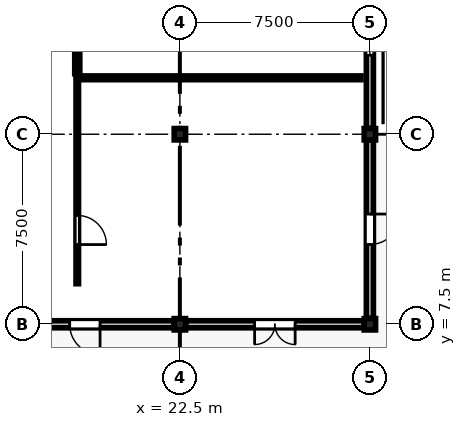
"""IFC4 building model, lengths in metres.
Left out: names, types, materials, properties, quantities, classifications, styles, units other than length and angle.
Written with IfcOpenShell. Run it as: python <this file> out.ifc"""

import sys

from ifc_helpers import new_model, si_unit, direction, frame, frame_2d, origin, origin_2d, place, context, subcontext, project, spatial, rectangle, extrude, element, fill, save


model = new_model("IFC4")
c1 = context("Model", 3, precision=1e-05, world=origin(), true_north=direction((0.0, 1.0)))
c2 = subcontext(c1, "Body", "Model", "MODEL_VIEW")
j1 = project(units=[si_unit("LENGTHUNIT", "METRE"), si_unit("PLANEANGLEUNIT", "RADIAN")], contexts=[c1])
p1 = place(None, origin())
s1 = spatial("IfcSite", under=j1, at=p1, CompositionType="ELEMENT")
p2 = place(p1, origin())
s2 = spatial("IfcBuilding", under=s1, at=p2, CompositionType="ELEMENT")
p3 = place(p2, frame((0.0, 0.0, 30.0)))
s3 = spatial("IfcBuildingStorey", under=s2, at=p3, CompositionType="ELEMENT", Elevation=30.0)
for number, where, z_axis, x_axis in (
    (1, (22.5, 7.5, 0.0), (0.0, 0.0, 1.0), (1.0, 0.0, 0.0)),
    (2, (22.5, 15.0, 0.0), (0.0, 0.0, 1.0), (1.0, 0.0, 0.0)),
    (3, (30.0, 7.5, 0.0), (0.0, 0.0, 1.0), (1.0, 0.0, 0.0)),
    (4, (30.0, 15.0, 0.0), (0.0, 0.0, 1.0), (1.0, 0.0, 0.0)),
):
    element("IfcColumn", number, at=place(p3, frame(where, z_axis=z_axis, x_axis=x_axis)), inside=s3, PredefinedType="COLUMN", context=c2, shape_type="SweptSolid", body=[
        extrude(rectangle(XDim=0.45, YDim=0.45, at=origin_2d()), origin(), (0.0, 0.0, 1.0), 4.05),
    ])
p4 = place(p3, frame((22.265, 7.5, 0.0), z_axis=(0.0, 0.0, 1.0), x_axis=(-1.0, 0.0, 0.0)))
e5 = element("IfcWall", 5, at=p4, inside=s3, PredefinedType="STANDARD", context=c2, shape_type="SweptSolid", body=[
    extrude(rectangle(XDim=7.03, YDim=0.28, at=frame_2d((3.515, 0.0))), origin(), (0.0, 0.0, 1.0), 3.23),
])
p5 = place(p4, frame((2.915, 0.0, 0.0)))
e6 = element("IfcOpeningElement", 6, at=p5, cuts=e5, PredefinedType="OPENING", context=c2, shape_type="SweptSolid", body=[
    extrude(rectangle(XDim=1.2, YDim=2.3, at=frame_2d((0.6, 1.15))), frame((0.0, 0.15, 0.0), z_axis=(0.0, -1.0, 0.0), x_axis=(1.0, 0.0, 0.0)), (0.0, 0.0, 1.0), 0.3),
])
p6 = place(p3, frame((29.765, 7.5, 0.0), z_axis=(0.0, 0.0, 1.0), x_axis=(-1.0, 0.0, 0.0)))
e7 = element("IfcWall", 7, at=p6, inside=s3, PredefinedType="STANDARD", context=c2, shape_type="SweptSolid", body=[
    extrude(rectangle(XDim=7.03, YDim=0.28, at=frame_2d((3.515, 0.0))), origin(), (0.0, 0.0, 1.0), 3.23),
])
p7 = place(p6, frame((2.715, 0.0, 0.0)))
e8 = element("IfcOpeningElement", 8, at=p7, cuts=e7, PredefinedType="OPENING", context=c2, shape_type="SweptSolid", body=[
    extrude(rectangle(XDim=1.6, YDim=2.35, at=frame_2d((0.8, 1.175))), frame((0.0, 0.15, 0.0), z_axis=(0.0, -1.0, 0.0), x_axis=(1.0, 0.0, 0.0)), (0.0, 0.0, 1.0), 0.3),
])
p8 = place(p3, frame((30.0, 14.765, 0.0), z_axis=(0.0, 0.0, 1.0), x_axis=(0.0, -1.0, 0.0)))
e9 = element("IfcWall", 9, at=p8, inside=s3, PredefinedType="STANDARD", context=c2, shape_type="SweptSolid", body=[
    extrude(rectangle(XDim=7.03, YDim=0.28, at=frame_2d((3.515, 0.0))), origin(), (0.0, 0.0, 1.0), 3.23),
])
p9 = place(p8, frame((2.915, 0.0, 0.0)))
e10 = element("IfcOpeningElement", 10, at=p9, cuts=e9, PredefinedType="OPENING", context=c2, shape_type="SweptSolid", body=[
    extrude(rectangle(XDim=1.2, YDim=2.3, at=frame_2d((0.6, 1.15))), frame((0.0, 0.15, 0.0), z_axis=(0.0, -1.0, 0.0), x_axis=(1.0, 0.0, 0.0)), (0.0, 0.0, 1.0), 0.3),
])
p10 = place(p3, frame((30.0, 22.35, 0.0), z_axis=(0.0, 0.0, 1.0), x_axis=(0.0, -1.0, 0.0)))
e11 = element("IfcWall", 11, at=p10, inside=s3, PredefinedType="STANDARD", context=c2, shape_type="SweptSolid", body=[
    extrude(rectangle(XDim=7.115, YDim=0.28, at=frame_2d((3.558, 0.0))), origin(), (0.0, 0.0, 1.0), 3.83),
])
p11 = place(p10, frame((2.883, 0.0, 0.85)))
e12 = element("IfcOpeningElement", 12, at=p11, cuts=e11, PredefinedType="OPENING", context=c2, shape_type="SweptSolid", body=[
    extrude(rectangle(XDim=1.35, YDim=2.25, at=frame_2d((0.675, 1.125))), frame((0.0, 0.15, 0.0), z_axis=(0.0, -1.0, 0.0), x_axis=(1.0, 0.0, 0.0)), (0.0, 0.0, 1.0), 0.3),
])
p12 = place(p3, frame((18.45, 17.227, 0.0), z_axis=(0.0, 0.0, 1.0), x_axis=(0.0, -1.0, 0.0)))
e13 = element("IfcWall", 13, at=p12, inside=s3, PredefinedType="PARTITIONING", context=c2, shape_type="SweptSolid", body=[
    extrude(rectangle(XDim=8.127, YDim=0.1, at=frame_2d((4.063, 0.0))), origin(), (0.0, 0.0, 1.0), 3.815),
])
p13 = place(p12, frame((5.432, 0.0, 0.0)))
e14 = element("IfcOpeningElement", 14, at=p13, cuts=e13, PredefinedType="OPENING", context=c2, shape_type="SweptSolid", body=[
    extrude(rectangle(XDim=1.15, YDim=2.2, at=frame_2d((0.575, 1.1))), frame((0.0, 0.06, 0.0), z_axis=(0.0, -1.0, 0.0), x_axis=(1.0, 0.0, 0.0)), (0.0, 0.0, 1.0), 0.12),
])
p14 = place(p3, frame((18.45, 27.034, 0.0), z_axis=(0.0, 0.0, 1.0), x_axis=(0.0, -1.0, 0.0)))
e15 = element("IfcWall", 15, at=p14, inside=s3, PredefinedType="STANDARD", context=c2, shape_type="SweptSolid", body=[
    extrude(rectangle(XDim=9.647, YDim=0.2, at=frame_2d((4.823, 0.0))), origin(), (0.0, 0.0, 1.0), 3.815),
])
p15 = place(p14, frame((0.25, 0.0, 0.0)))
e16 = element("IfcOpeningElement", 16, at=p15, cuts=e15, PredefinedType="OPENING", context=c2, shape_type="SweptSolid", body=[
    extrude(rectangle(XDim=1.15, YDim=2.2, at=frame_2d((0.575, 1.1))), frame((0.0, 0.11, 0.0), z_axis=(0.0, -1.0, 0.0), x_axis=(1.0, 0.0, 0.0)), (0.0, 0.0, 1.0), 0.22),
])
p16 = place(p3, frame((18.45, 17.227, 0.0), z_axis=(0.0, 0.0, 1.0), x_axis=(1.0, 0.0, 0.0)))
e17 = element("IfcWall", 17, at=p16, inside=s3, PredefinedType="PARTITIONING", context=c2, shape_type="SweptSolid", body=[
    extrude(rectangle(XDim=11.2, YDim=0.15, at=frame_2d((5.6, 0.0))), origin(), (0.0, 0.0, 1.0), 3.815),
])
p17 = place(p5, origin())
e18 = element("IfcDoor", 18, at=p17, inside=s3, OperationType="SINGLE_SWING_LEFT", PredefinedType="DOOR", context=c2, shape_type="SweptSolid", body=[
    extrude(rectangle(XDim=1.2, YDim=2.3, at=frame_2d((0.6, 1.15))), frame((0.0, 0.025, 0.0), z_axis=(0.0, -1.0, 0.0), x_axis=(1.0, 0.0, 0.0)), (0.0, 0.0, 1.0), 0.05),
])
fill(e6, e18)
p18 = place(p7, origin())
e19 = element("IfcDoor", 19, at=p18, inside=s3, OperationType="DOUBLE_DOOR_SINGLE_SWING", PredefinedType="DOOR", context=c2, shape_type="SweptSolid", body=[
    extrude(rectangle(XDim=1.6, YDim=2.35, at=frame_2d((0.8, 1.175))), frame((0.0, 0.025, 0.0), z_axis=(0.0, -1.0, 0.0), x_axis=(1.0, 0.0, 0.0)), (0.0, 0.0, 1.0), 0.05),
])
fill(e8, e19)
p19 = place(p9, origin())
e20 = element("IfcDoor", 20, at=p19, inside=s3, OperationType="SINGLE_SWING_LEFT", PredefinedType="DOOR", context=c2, shape_type="SweptSolid", body=[
    extrude(rectangle(XDim=1.2, YDim=2.3, at=frame_2d((0.6, 1.15))), frame((0.0, 0.025, 0.0), z_axis=(0.0, -1.0, 0.0), x_axis=(1.0, 0.0, 0.0)), (0.0, 0.0, 1.0), 0.05),
])
fill(e10, e20)
p20 = place(p11, origin())
e21 = element("IfcWindow", 21, at=p20, inside=s3, PartitioningType="SINGLE_PANEL", PredefinedType="WINDOW", context=c2, shape_type="SweptSolid", body=[
    extrude(rectangle(XDim=1.35, YDim=2.25, at=frame_2d((0.675, 1.125))), frame((0.0, 0.03, 0.0), z_axis=(0.0, -1.0, 0.0), x_axis=(1.0, 0.0, 0.0)), (0.0, 0.0, 1.0), 0.06),
])
fill(e12, e21)
p21 = place(p13, origin())
e22 = element("IfcDoor", 22, at=p21, inside=s3, OperationType="SINGLE_SWING_RIGHT", PredefinedType="DOOR", context=c2, shape_type="SweptSolid", body=[
    extrude(rectangle(XDim=1.15, YDim=2.2, at=frame_2d((0.575, 1.1))), frame((0.0, 0.025, 0.0), z_axis=(0.0, -1.0, 0.0), x_axis=(1.0, 0.0, 0.0)), (0.0, 0.0, 1.0), 0.05),
])
fill(e14, e22)
save(model, sys.argv[1])
